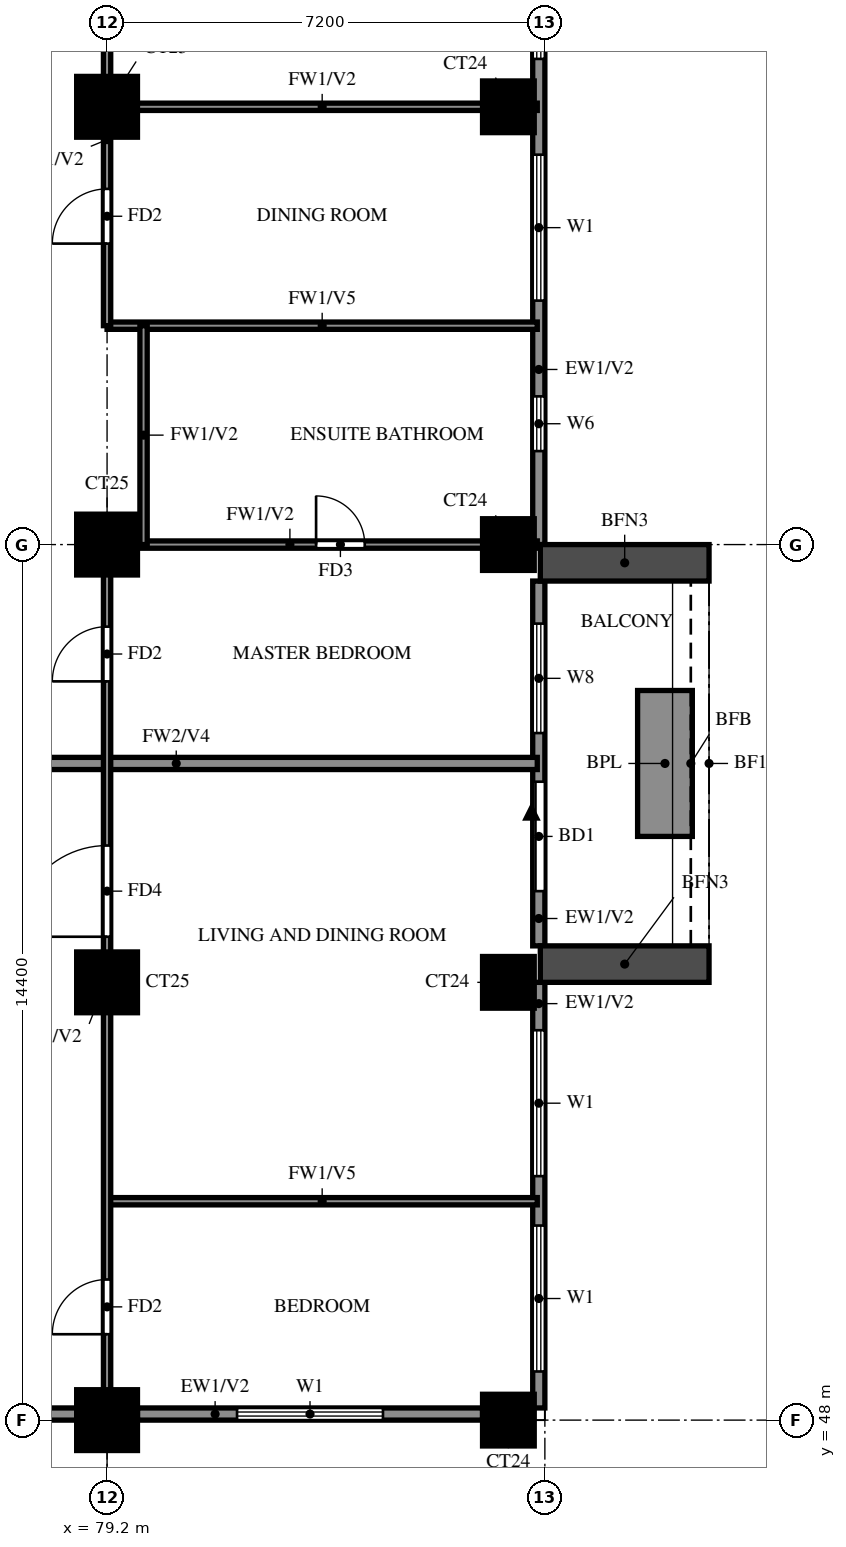
"""IFC4 building model, lengths in metres.
Left out: names, types, materials, properties, quantities, classifications, styles, units other than length and angle.
Written with IfcOpenShell. Run it as: python <this file> out.ifc"""

import sys

from ifc_helpers import new_model, si_unit, direction, frame, frame_2d, origin, origin_2d, place, context, subcontext, project, spatial, rectangle, extrude, source, transform, mapped, element, fill, save


model = new_model("IFC4")
c1 = context("Model", 3, precision=1e-05, world=origin(), true_north=direction((0.0, 1.0)))
c2 = subcontext(c1, "Body", "Model", "MODEL_VIEW")
j1 = project(units=[si_unit("LENGTHUNIT", "METRE"), si_unit("PLANEANGLEUNIT", "RADIAN")], contexts=[c1])
p1 = place(None, origin())
s1 = spatial("IfcSite", under=j1, at=p1, CompositionType="ELEMENT")
p2 = place(p1, origin())
s2 = spatial("IfcBuilding", under=s1, at=p2, CompositionType="ELEMENT")
p3 = place(p2, frame((0.0, 0.0, 146.5)))
s3 = spatial("IfcBuildingStorey", under=s2, at=p3, CompositionType="ELEMENT", Elevation=146.5)
m1 = source(origin(), c2, "Body", "SweptSolid", [
    extrude(rectangle(XDim=1.0, YDim=1.0, at=origin_2d()), origin(), (0.0, 0.0, 1.0), 3.2),
])
p4 = place(p3, frame((79.2, 48.0, 0.0), z_axis=(0.0, 0.0, 1.0), x_axis=(1.0, 0.0, 0.0)))
e1 = element("IfcColumn", 1, at=p4, inside=s3, PredefinedType="COLUMN", context=c2, shape_type="MappedRepresentation", body=[
    mapped(m1, transform((0.0, 0.0, 0.0))),
])
m2 = source(origin(), c2, "Body", "SweptSolid", [
    extrude(rectangle(XDim=0.85, YDim=0.85, at=origin_2d()), origin(), (0.0, 0.0, 1.0), 3.2),
])
p5 = place(p3, frame((85.8, 48.0, 0.0), z_axis=(0.0, 0.0, 1.0), x_axis=(1.0, 0.0, 0.0)))
e2 = element("IfcColumn", 2, at=p5, inside=s3, PredefinedType="COLUMN", context=c2, shape_type="MappedRepresentation", body=[
    mapped(m2, transform((0.0, 0.0, 0.0))),
])
p6 = place(p3, frame((79.2, 55.2, 0.0), z_axis=(0.0, 0.0, 1.0), x_axis=(1.0, 0.0, 0.0)))
e3 = element("IfcColumn", 3, at=p6, inside=s3, PredefinedType="COLUMN", context=c2, shape_type="MappedRepresentation", body=[
    mapped(m1, transform((0.0, 0.0, 0.0))),
])
p7 = place(p3, frame((85.8, 55.2, 0.0), z_axis=(0.0, 0.0, 1.0), x_axis=(1.0, 0.0, 0.0)))
e4 = element("IfcColumn", 4, at=p7, inside=s3, PredefinedType="COLUMN", context=c2, shape_type="MappedRepresentation", body=[
    mapped(m2, transform((0.0, 0.0, 0.0))),
])
p8 = place(p3, frame((79.2, 62.4, 0.0), z_axis=(0.0, 0.0, 1.0), x_axis=(1.0, 0.0, 0.0)))
e5 = element("IfcColumn", 5, at=p8, inside=s3, PredefinedType="COLUMN", context=c2, shape_type="MappedRepresentation", body=[
    mapped(m1, transform((0.0, 0.0, 0.0))),
])
p9 = place(p3, frame((85.8, 62.4, 0.0), z_axis=(0.0, 0.0, 1.0), x_axis=(1.0, 0.0, 0.0)))
e6 = element("IfcColumn", 6, at=p9, inside=s3, PredefinedType="COLUMN", context=c2, shape_type="MappedRepresentation", body=[
    mapped(m2, transform((0.0, 0.0, 0.0))),
])
p10 = place(p3, frame((79.2, 69.6, 0.0), z_axis=(0.0, 0.0, 1.0), x_axis=(1.0, 0.0, 0.0)))
e7 = element("IfcColumn", 7, at=p10, inside=s3, PredefinedType="COLUMN", context=c2, shape_type="MappedRepresentation", body=[
    mapped(m1, transform((0.0, 0.0, 0.0))),
])
p11 = place(p3, frame((85.8, 69.6, 0.0), z_axis=(0.0, 0.0, 1.0), x_axis=(1.0, 0.0, 0.0)))
e8 = element("IfcColumn", 8, at=p11, inside=s3, PredefinedType="COLUMN", context=c2, shape_type="MappedRepresentation", body=[
    mapped(m2, transform((0.0, 0.0, 0.0))),
])
p12 = place(p3, frame((85.719, 39.881, 0.0), z_axis=(0.0, 0.0, 1.0), x_axis=(-0.86377618652, 0.503875678716, 0.0)))
e9 = element("IfcWall", 9, at=p12, inside=s3, PredefinedType="SOLIDWALL", context=c2, shape_type="SweptSolid", body=[
    extrude(rectangle(XDim=16.311, YDim=0.2, at=frame_2d((8.156, 0.0))), origin(), (0.0, 0.0, 1.0), 3.2),
])
p13 = place(p12, frame((13.326, 0.0, 1.5)))
e10 = element("IfcOpeningElement", 10, at=p13, cuts=e9, PredefinedType="OPENING", context=c2, shape_type="SweptSolid", body=[
    extrude(rectangle(XDim=0.9, YDim=0.9, at=frame_2d((0.45, 0.45))), frame((0.0, 0.11, 0.0), z_axis=(0.0, -1.0, 0.0), x_axis=(1.0, 0.0, 0.0)), (0.0, 0.0, 1.0), 0.22),
])
p14 = place(p3, frame((71.99, 48.1, 0.0), z_axis=(0.0, 0.0, 1.0), x_axis=(1.0, 0.0, 0.0)))
e11 = element("IfcWall", 11, at=p14, inside=s3, PredefinedType="SOLIDWALL", context=c2, shape_type="SweptSolid", body=[
    extrude(rectangle(XDim=6.71, YDim=0.2, at=frame_2d((3.355, 0.0))), origin(), (0.0, 0.0, 1.0), 3.2),
])
p15 = place(p14, frame((2.205, 0.0, 1.5)))
e12 = element("IfcOpeningElement", 12, at=p15, cuts=e11, PredefinedType="OPENING", context=c2, shape_type="SweptSolid", body=[
    extrude(rectangle(XDim=0.9, YDim=0.9, at=frame_2d((0.45, 0.45))), frame((0.0, 0.11, 0.0), z_axis=(0.0, -1.0, 0.0), x_axis=(1.0, 0.0, 0.0)), (0.0, 0.0, 1.0), 0.22),
])
p16 = place(p3, frame((79.7, 48.1, 0.0), z_axis=(0.0, 0.0, 1.0), x_axis=(1.0, 0.0, 0.0)))
e13 = element("IfcWall", 13, at=p16, inside=s3, PredefinedType="SOLIDWALL", context=c2, shape_type="SweptSolid", body=[
    extrude(rectangle(XDim=5.675, YDim=0.2, at=frame_2d((2.837, 0.0))), origin(), (0.0, 0.0, 1.0), 3.2),
])
p17 = place(p16, frame((1.637, 0.0, 0.6)))
e14 = element("IfcOpeningElement", 14, at=p17, cuts=e13, PredefinedType="OPENING", context=c2, shape_type="SweptSolid", body=[
    extrude(rectangle(XDim=2.4, YDim=2.4, at=frame_2d((1.2, 1.2))), frame((0.0, 0.11, 0.0), z_axis=(0.0, -1.0, 0.0), x_axis=(1.0, 0.0, 0.0)), (0.0, 0.0, 1.0), 0.22),
])
p18 = place(p3, frame((86.3, 48.2, 0.0), z_axis=(0.0, 0.0, 1.0), x_axis=(0.0, 1.0, 0.0)))
e15 = element("IfcWall", 15, at=p18, inside=s3, PredefinedType="SOLIDWALL", context=c2, shape_type="SweptSolid", body=[
    extrude(rectangle(XDim=7.0, YDim=0.2, at=frame_2d((3.5, 0.0))), origin(), (0.0, 0.0, 1.0), 3.2),
])
p19 = place(p18, frame((0.6, 0.0, 0.6)))
e16 = element("IfcOpeningElement", 16, at=p19, cuts=e15, PredefinedType="OPENING", context=c2, shape_type="SweptSolid", body=[
    extrude(rectangle(XDim=2.4, YDim=2.4, at=frame_2d((1.2, 1.2))), frame((0.0, 0.11, 0.0), z_axis=(0.0, -1.0, 0.0), x_axis=(1.0, 0.0, 0.0)), (0.0, 0.0, 1.0), 0.22),
])
p20 = place(p18, frame((3.812, 0.0, 0.6)))
e17 = element("IfcOpeningElement", 17, at=p20, cuts=e15, PredefinedType="OPENING", context=c2, shape_type="SweptSolid", body=[
    extrude(rectangle(XDim=2.4, YDim=2.4, at=frame_2d((1.2, 1.2))), frame((0.0, 0.11, 0.0), z_axis=(0.0, -1.0, 0.0), x_axis=(1.0, 0.0, 0.0)), (0.0, 0.0, 1.0), 0.22),
])
p21 = place(p3, frame((86.3, 55.8, 0.0), z_axis=(0.0, 0.0, 1.0), x_axis=(0.0, 1.0, 0.0)))
e18 = element("IfcWall", 18, at=p21, inside=s3, PredefinedType="SOLIDWALL", context=c2, shape_type="SweptSolid", body=[
    extrude(rectangle(XDim=6.0, YDim=0.2, at=frame_2d((3.0, 0.0))), origin(), (0.0, 0.0, 1.0), 3.2),
])
p22 = place(p21, frame((0.9, 0.0, 0.0)))
e19 = element("IfcOpeningElement", 19, at=p22, cuts=e18, PredefinedType="OPENING", context=c2, shape_type="SweptSolid", body=[
    extrude(rectangle(XDim=1.8, YDim=2.4, at=frame_2d((0.9, 1.2))), frame((0.0, 0.11, 0.0), z_axis=(0.0, -1.0, 0.0), x_axis=(1.0, 0.0, 0.0)), (0.0, 0.0, 1.0), 0.22),
])
p23 = place(p21, frame((3.5, 0.0, 0.6)))
e20 = element("IfcOpeningElement", 20, at=p23, cuts=e18, PredefinedType="OPENING", context=c2, shape_type="SweptSolid", body=[
    extrude(rectangle(XDim=1.8, YDim=2.4, at=frame_2d((0.9, 1.2))), frame((0.0, 0.11, 0.0), z_axis=(0.0, -1.0, 0.0), x_axis=(1.0, 0.0, 0.0)), (0.0, 0.0, 1.0), 0.22),
])
p24 = place(p3, frame((86.3, 62.4, 0.0), z_axis=(0.0, 0.0, 1.0), x_axis=(0.0, 1.0, 0.0)))
e21 = element("IfcWall", 21, at=p24, inside=s3, PredefinedType="SOLIDWALL", context=c2, shape_type="SweptSolid", body=[
    extrude(rectangle(XDim=14.4, YDim=0.2, at=frame_2d((7.2, 0.0))), origin(), (0.0, 0.0, 1.0), 3.2),
])
p25 = place(p24, frame((1.538, 0.0, 1.5)))
e22 = element("IfcOpeningElement", 22, at=p25, cuts=e21, PredefinedType="OPENING", context=c2, shape_type="SweptSolid", body=[
    extrude(rectangle(XDim=0.9, YDim=0.9, at=frame_2d((0.45, 0.45))), frame((0.0, 0.11, 0.0), z_axis=(0.0, -1.0, 0.0), x_axis=(1.0, 0.0, 0.0)), (0.0, 0.0, 1.0), 0.22),
])
p26 = place(p24, frame((4.012, 0.0, 0.6)))
e23 = element("IfcOpeningElement", 23, at=p26, cuts=e21, PredefinedType="OPENING", context=c2, shape_type="SweptSolid", body=[
    extrude(rectangle(XDim=2.4, YDim=2.4, at=frame_2d((1.2, 1.2))), frame((0.0, 0.11, 0.0), z_axis=(0.0, -1.0, 0.0), x_axis=(1.0, 0.0, 0.0)), (0.0, 0.0, 1.0), 0.22),
])
p27 = place(p24, frame((7.988, 0.0, 0.6)))
e24 = element("IfcOpeningElement", 24, at=p27, cuts=e21, PredefinedType="OPENING", context=c2, shape_type="SweptSolid", body=[
    extrude(rectangle(XDim=2.4, YDim=2.4, at=frame_2d((1.2, 1.2))), frame((0.0, 0.11, 0.0), z_axis=(0.0, -1.0, 0.0), x_axis=(1.0, 0.0, 0.0)), (0.0, 0.0, 1.0), 0.22),
])
p28 = place(p24, frame((11.212, 0.0, 0.6)))
e25 = element("IfcOpeningElement", 25, at=p28, cuts=e21, PredefinedType="OPENING", context=c2, shape_type="SweptSolid", body=[
    extrude(rectangle(XDim=2.4, YDim=2.4, at=frame_2d((1.2, 1.2))), frame((0.0, 0.11, 0.0), z_axis=(0.0, -1.0, 0.0), x_axis=(1.0, 0.0, 0.0)), (0.0, 0.0, 1.0), 0.22),
])
for number, where, z_axis, x_axis in (
    (26, (86.325, 55.5, 0.0), (0.0, 0.0, 1.0), (1.0, 0.0, 0.0)),
    (27, (86.325, 62.1, 0.0), (0.0, 0.0, 1.0), (1.0, 0.0, 0.0)),
):
    element("IfcWall", number, at=place(p3, frame(where, z_axis=z_axis, x_axis=x_axis)), inside=s3, PredefinedType="SOLIDWALL", context=c2, shape_type="SweptSolid", body=[
        extrude(rectangle(XDim=2.775, YDim=0.6, at=frame_2d((1.388, 0.0))), origin(), (0.0, 0.0, 1.0), 2.85),
    ])
p29 = place(p3, frame((88.375, 57.6, 0.0), z_axis=(0.0, 0.0, 1.0), x_axis=(0.0, 1.0, 0.0)))
e28 = element("IfcWall", 28, at=p29, inside=s3, PredefinedType="SOLIDWALL", context=c2, shape_type="SweptSolid", body=[
    extrude(rectangle(XDim=2.4, YDim=0.9, at=frame_2d((1.2, 0.0))), origin(), (0.0, 0.0, 1.0), 0.9),
])
p30 = place(p3, frame((74.4, 58.8, 0.0), z_axis=(0.0, 0.0, 1.0), x_axis=(1.0, 0.0, 0.0)))
e29 = element("IfcWall", 29, at=p30, inside=s3, PredefinedType="SOLIDWALL", context=c2, shape_type="SweptSolid", body=[
    extrude(rectangle(XDim=11.875, YDim=0.2, at=frame_2d((5.938, 0.0))), origin(), (0.0, 0.0, 1.0), 2.3),
])
p31 = place(p3, frame((79.2, 51.6, 0.0), z_axis=(0.0, 0.0, 1.0), x_axis=(1.0, 0.0, 0.0)))
e30 = element("IfcWall", 30, at=p31, inside=s3, PredefinedType="PARTITIONING", context=c2, shape_type="SweptSolid", body=[
    extrude(rectangle(XDim=7.075, YDim=0.12, at=frame_2d((3.538, 0.0))), origin(), (0.0, 0.0, 1.0), 2.3),
])
p32 = place(p3, frame((79.2, 62.4, 0.0), z_axis=(0.0, 0.0, 1.0), x_axis=(1.0, 0.0, 0.0)))
e31 = element("IfcWall", 31, at=p32, inside=s3, PredefinedType="PARTITIONING", context=c2, shape_type="SweptSolid", body=[
    extrude(rectangle(XDim=7.075, YDim=0.12, at=frame_2d((3.538, 0.0))), origin(), (0.0, 0.0, 1.0), 3.2),
])
p33 = place(p32, frame((3.438, 0.0, 0.0)))
e32 = element("IfcOpeningElement", 32, at=p33, cuts=e31, PredefinedType="OPENING", context=c2, shape_type="SweptSolid", body=[
    extrude(rectangle(XDim=0.8, YDim=2.1, at=frame_2d((0.4, 1.05))), frame((0.0, 0.07, 0.0), z_axis=(0.0, -1.0, 0.0), x_axis=(1.0, 0.0, 0.0)), (0.0, 0.0, 1.0), 0.14),
])
p34 = place(p3, frame((79.2, 66.0, 0.0), z_axis=(0.0, 0.0, 1.0), x_axis=(1.0, 0.0, 0.0)))
e33 = element("IfcWall", 33, at=p34, inside=s3, PredefinedType="PARTITIONING", context=c2, shape_type="SweptSolid", body=[
    extrude(rectangle(XDim=7.075, YDim=0.12, at=frame_2d((3.538, 0.0))), origin(), (0.0, 0.0, 1.0), 2.3),
])
p35 = place(p3, frame((79.2, 69.6, 0.0), z_axis=(0.0, 0.0, 1.0), x_axis=(1.0, 0.0, 0.0)))
e34 = element("IfcWall", 34, at=p35, inside=s3, PredefinedType="PARTITIONING", context=c2, shape_type="SweptSolid", body=[
    extrude(rectangle(XDim=7.075, YDim=0.12, at=frame_2d((3.538, 0.0))), origin(), (0.0, 0.0, 1.0), 3.2),
])
p36 = place(p3, frame((79.2, 48.125, 0.0), z_axis=(0.0, 0.0, 1.0), x_axis=(0.0, 1.0, 0.0)))
e35 = element("IfcWall", 35, at=p36, inside=s3, PredefinedType="PARTITIONING", context=c2, shape_type="SweptSolid", body=[
    extrude(rectangle(XDim=14.275, YDim=0.12, at=frame_2d((7.137, 0.0))), origin(), (0.0, 0.0, 1.0), 3.2),
])
p37 = place(p36, frame((1.288, 0.0, 0.0)))
e36 = element("IfcOpeningElement", 36, at=p37, cuts=e35, PredefinedType="OPENING", context=c2, shape_type="SweptSolid", body=[
    extrude(rectangle(XDim=0.9, YDim=2.1, at=frame_2d((0.45, 1.05))), frame((0.0, 0.07, 0.0), z_axis=(0.0, -1.0, 0.0), x_axis=(1.0, 0.0, 0.0)), (0.0, 0.0, 1.0), 0.14),
])
p38 = place(p36, frame((7.825, 0.0, 0.0)))
e37 = element("IfcOpeningElement", 37, at=p38, cuts=e35, PredefinedType="OPENING", context=c2, shape_type="SweptSolid", body=[
    extrude(rectangle(XDim=1.5, YDim=2.1, at=frame_2d((0.75, 1.05))), frame((0.0, 0.07, 0.0), z_axis=(0.0, -1.0, 0.0), x_axis=(1.0, 0.0, 0.0)), (0.0, 0.0, 1.0), 0.14),
])
p39 = place(p36, frame((12.025, 0.0, 0.0)))
e38 = element("IfcOpeningElement", 38, at=p39, cuts=e35, PredefinedType="OPENING", context=c2, shape_type="SweptSolid", body=[
    extrude(rectangle(XDim=0.9, YDim=2.1, at=frame_2d((0.45, 1.05))), frame((0.0, 0.07, 0.0), z_axis=(0.0, -1.0, 0.0), x_axis=(1.0, 0.0, 0.0)), (0.0, 0.0, 1.0), 0.14),
])
p40 = place(p3, frame((79.2, 66.0, 0.0), z_axis=(0.0, 0.0, 1.0), x_axis=(0.0, 1.0, 0.0)))
e39 = element("IfcWall", 39, at=p40, inside=s3, PredefinedType="PARTITIONING", context=c2, shape_type="SweptSolid", body=[
    extrude(rectangle(XDim=7.2, YDim=0.12, at=frame_2d((3.6, 0.0))), origin(), (0.0, 0.0, 1.0), 3.2),
])
p41 = place(p40, frame((1.35, 0.0, 0.0)))
e40 = element("IfcOpeningElement", 40, at=p41, cuts=e39, PredefinedType="OPENING", context=c2, shape_type="SweptSolid", body=[
    extrude(rectangle(XDim=0.9, YDim=2.1, at=frame_2d((0.45, 1.05))), frame((0.0, 0.07, 0.0), z_axis=(0.0, -1.0, 0.0), x_axis=(1.0, 0.0, 0.0)), (0.0, 0.0, 1.0), 0.14),
])
p42 = place(p40, frame((4.95, 0.0, 0.0)))
e41 = element("IfcOpeningElement", 41, at=p42, cuts=e39, PredefinedType="OPENING", context=c2, shape_type="SweptSolid", body=[
    extrude(rectangle(XDim=0.9, YDim=2.1, at=frame_2d((0.45, 1.05))), frame((0.0, 0.07, 0.0), z_axis=(0.0, -1.0, 0.0), x_axis=(1.0, 0.0, 0.0)), (0.0, 0.0, 1.0), 0.14),
])
p43 = place(p3, frame((79.8, 62.4, 0.0), z_axis=(0.0, 0.0, 1.0), x_axis=(0.0, 1.0, 0.0)))
e42 = element("IfcWall", 42, at=p43, inside=s3, PredefinedType="PARTITIONING", context=c2, shape_type="SweptSolid", body=[
    extrude(rectangle(XDim=3.6, YDim=0.12, at=frame_2d((1.8, 0.0))), origin(), (0.0, 0.0, 1.0), 3.2),
])
p44 = place(p17, origin())
e43 = element("IfcWindow", 43, at=p44, inside=s3, PartitioningType="DOUBLE_PANEL_VERTICAL", PredefinedType="WINDOW", context=c2, shape_type="SweptSolid", body=[
    extrude(rectangle(XDim=2.4, YDim=2.4, at=frame_2d((1.2, 1.2))), frame((0.0, 0.03, 0.0), z_axis=(0.0, -1.0, 0.0), x_axis=(1.0, 0.0, 0.0)), (0.0, 0.0, 1.0), 0.06),
])
fill(e14, e43)
p45 = place(p19, origin())
e44 = element("IfcWindow", 44, at=p45, inside=s3, PartitioningType="DOUBLE_PANEL_VERTICAL", PredefinedType="WINDOW", context=c2, shape_type="SweptSolid", body=[
    extrude(rectangle(XDim=2.4, YDim=2.4, at=frame_2d((1.2, 1.2))), frame((0.0, 0.03, 0.0), z_axis=(0.0, -1.0, 0.0), x_axis=(1.0, 0.0, 0.0)), (0.0, 0.0, 1.0), 0.06),
])
fill(e16, e44)
p46 = place(p20, origin())
e45 = element("IfcWindow", 45, at=p46, inside=s3, PartitioningType="DOUBLE_PANEL_VERTICAL", PredefinedType="WINDOW", context=c2, shape_type="SweptSolid", body=[
    extrude(rectangle(XDim=2.4, YDim=2.4, at=frame_2d((1.2, 1.2))), frame((0.0, 0.03, 0.0), z_axis=(0.0, -1.0, 0.0), x_axis=(1.0, 0.0, 0.0)), (0.0, 0.0, 1.0), 0.06),
])
fill(e17, e45)
p47 = place(p22, origin())
e46 = element("IfcDoor", 46, at=p47, inside=s3, OperationType="DOUBLE_DOOR_SLIDING", PredefinedType="DOOR", context=c2, shape_type="SweptSolid", body=[
    extrude(rectangle(XDim=1.8, YDim=2.4, at=frame_2d((0.9, 1.2))), frame((0.0, 0.025, 0.0), z_axis=(0.0, -1.0, 0.0), x_axis=(1.0, 0.0, 0.0)), (0.0, 0.0, 1.0), 0.05),
])
fill(e19, e46)
p48 = place(p23, origin())
e47 = element("IfcWindow", 47, at=p48, inside=s3, PartitioningType="DOUBLE_PANEL_VERTICAL", PredefinedType="WINDOW", context=c2, shape_type="SweptSolid", body=[
    extrude(rectangle(XDim=1.8, YDim=2.4, at=frame_2d((0.9, 1.2))), frame((0.0, 0.03, 0.0), z_axis=(0.0, -1.0, 0.0), x_axis=(1.0, 0.0, 0.0)), (0.0, 0.0, 1.0), 0.06),
])
fill(e20, e47)
p49 = place(p25, origin())
e48 = element("IfcWindow", 48, at=p49, inside=s3, PartitioningType="SINGLE_PANEL", PredefinedType="WINDOW", context=c2, shape_type="SweptSolid", body=[
    extrude(rectangle(XDim=0.9, YDim=0.9, at=frame_2d((0.45, 0.45))), frame((0.0, 0.03, 0.0), z_axis=(0.0, -1.0, 0.0), x_axis=(1.0, 0.0, 0.0)), (0.0, 0.0, 1.0), 0.06),
])
fill(e22, e48)
p50 = place(p26, origin())
e49 = element("IfcWindow", 49, at=p50, inside=s3, PartitioningType="DOUBLE_PANEL_VERTICAL", PredefinedType="WINDOW", context=c2, shape_type="SweptSolid", body=[
    extrude(rectangle(XDim=2.4, YDim=2.4, at=frame_2d((1.2, 1.2))), frame((0.0, 0.03, 0.0), z_axis=(0.0, -1.0, 0.0), x_axis=(1.0, 0.0, 0.0)), (0.0, 0.0, 1.0), 0.06),
])
fill(e23, e49)
p51 = place(p27, origin())
e50 = element("IfcWindow", 50, at=p51, inside=s3, PartitioningType="DOUBLE_PANEL_VERTICAL", PredefinedType="WINDOW", context=c2, shape_type="SweptSolid", body=[
    extrude(rectangle(XDim=2.4, YDim=2.4, at=frame_2d((1.2, 1.2))), frame((0.0, 0.03, 0.0), z_axis=(0.0, -1.0, 0.0), x_axis=(1.0, 0.0, 0.0)), (0.0, 0.0, 1.0), 0.06),
])
fill(e24, e50)
p52 = place(p37, origin())
e51 = element("IfcDoor", 51, at=p52, inside=s3, OperationType="SINGLE_SWING_RIGHT", PredefinedType="DOOR", context=c2, shape_type="SweptSolid", body=[
    extrude(rectangle(XDim=0.9, YDim=2.1, at=frame_2d((0.45, 1.05))), frame((0.0, 0.025, 0.0), z_axis=(0.0, -1.0, 0.0), x_axis=(1.0, 0.0, 0.0)), (0.0, 0.0, 1.0), 0.05),
])
fill(e36, e51)
p53 = place(p38, origin())
e52 = element("IfcDoor", 52, at=p53, inside=s3, OperationType="SINGLE_SWING_RIGHT", PredefinedType="DOOR", context=c2, shape_type="SweptSolid", body=[
    extrude(rectangle(XDim=1.5, YDim=2.1, at=frame_2d((0.75, 1.05))), frame((0.0, 0.025, 0.0), z_axis=(0.0, -1.0, 0.0), x_axis=(1.0, 0.0, 0.0)), (0.0, 0.0, 1.0), 0.05),
])
fill(e37, e52)
p54 = place(p39, origin())
e53 = element("IfcDoor", 53, at=p54, inside=s3, OperationType="SINGLE_SWING_RIGHT", PredefinedType="DOOR", context=c2, shape_type="SweptSolid", body=[
    extrude(rectangle(XDim=0.9, YDim=2.1, at=frame_2d((0.45, 1.05))), frame((0.0, 0.025, 0.0), z_axis=(0.0, -1.0, 0.0), x_axis=(1.0, 0.0, 0.0)), (0.0, 0.0, 1.0), 0.05),
])
fill(e38, e53)
p55 = place(p33, origin())
e54 = element("IfcDoor", 54, at=p55, inside=s3, OperationType="SINGLE_SWING_LEFT", PredefinedType="DOOR", context=c2, shape_type="SweptSolid", body=[
    extrude(rectangle(XDim=0.8, YDim=2.1, at=frame_2d((0.4, 1.05))), frame((0.0, 0.025, 0.0), z_axis=(0.0, -1.0, 0.0), x_axis=(1.0, 0.0, 0.0)), (0.0, 0.0, 1.0), 0.05),
])
fill(e32, e54)
p56 = place(p41, origin())
e55 = element("IfcDoor", 55, at=p56, inside=s3, OperationType="SINGLE_SWING_LEFT", PredefinedType="DOOR", context=c2, shape_type="SweptSolid", body=[
    extrude(rectangle(XDim=0.9, YDim=2.1, at=frame_2d((0.45, 1.05))), frame((0.0, 0.025, 0.0), z_axis=(0.0, -1.0, 0.0), x_axis=(1.0, 0.0, 0.0)), (0.0, 0.0, 1.0), 0.05),
])
fill(e40, e55)
save(model, sys.argv[1])
